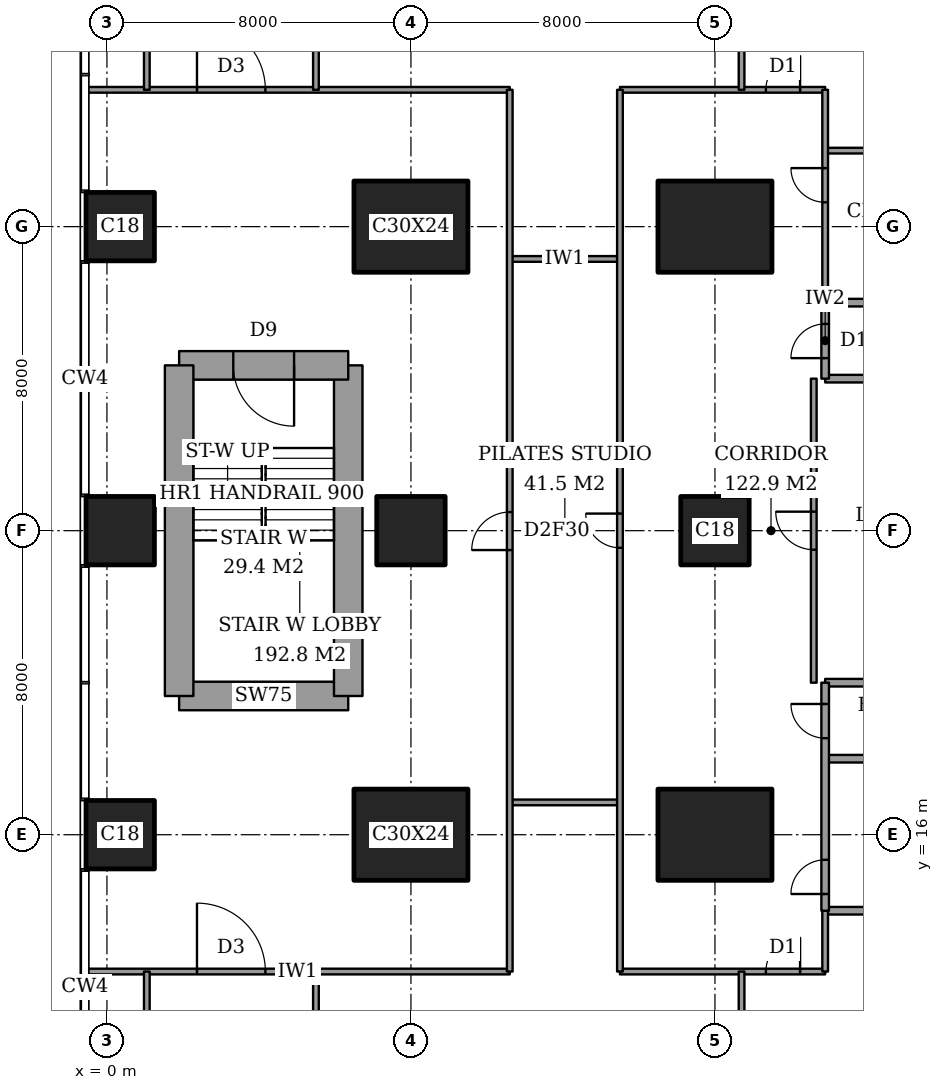
"""IFC4 building model, lengths in metres.
Left out: names, types, materials, properties, quantities, classifications, styles, units other than length and angle.
Written with IfcOpenShell. Run it as: python <this file> out.ifc"""

import sys

from ifc_helpers import new_model, si_unit, direction, frame, frame_2d, origin, origin_2d, place, context, subcontext, project, spatial, rectangle, extrude, element, fill, save


model = new_model("IFC4")
c1 = context("Model", 3, precision=1e-05, world=origin(), true_north=direction((0.0, 1.0)))
c2 = subcontext(c1, "Body", "Model", "MODEL_VIEW")
j1 = project(units=[si_unit("LENGTHUNIT", "METRE"), si_unit("PLANEANGLEUNIT", "RADIAN")], contexts=[c1])
p1 = place(None, origin())
s1 = spatial("IfcSite", under=j1, at=p1, CompositionType="ELEMENT")
p2 = place(p1, origin())
s2 = spatial("IfcBuilding", under=s1, at=p2, CompositionType="ELEMENT")
p3 = place(p2, frame((0.0, 0.0, 200.2)))
s3 = spatial("IfcBuildingStorey", under=s2, at=p3, CompositionType="ELEMENT", Elevation=200.2)
for number, where, z_axis, x_axis in (
    (1, (0.35, 16.0, 0.0), (0.0, 0.0, 1.0), (1.0, 0.0, 0.0)),
    (2, (0.35, 24.0, 0.0), (0.0, 0.0, 1.0), (1.0, 0.0, 0.0)),
    (3, (0.35, 32.0, 0.0), (0.0, 0.0, 1.0), (1.0, 0.0, 0.0)),
):
    element("IfcColumn", number, at=place(p3, frame(where, z_axis=z_axis, x_axis=x_axis)), inside=s3, PredefinedType="COLUMN", context=c2, shape_type="SweptSolid", body=[
        extrude(rectangle(XDim=1.8, YDim=1.8, at=origin_2d()), origin(), (0.0, 0.0, 1.0), 3.6),
    ])
p4 = place(p3, frame((8.0, 16.0, 0.0), z_axis=(0.0, 0.0, 1.0), x_axis=(1.0, 0.0, 0.0)))
e4 = element("IfcColumn", 4, at=p4, inside=s3, PredefinedType="COLUMN", context=c2, shape_type="SweptSolid", body=[
    extrude(rectangle(XDim=3.0, YDim=2.4, at=origin_2d()), origin(), (0.0, 0.0, 1.0), 3.6),
])
p5 = place(p3, frame((8.0, 24.0, 0.0), z_axis=(0.0, 0.0, 1.0), x_axis=(1.0, 0.0, 0.0)))
e5 = element("IfcColumn", 5, at=p5, inside=s3, PredefinedType="COLUMN", context=c2, shape_type="SweptSolid", body=[
    extrude(rectangle(XDim=1.8, YDim=1.8, at=origin_2d()), origin(), (0.0, 0.0, 1.0), 3.6),
])
for number, where, z_axis, x_axis in (
    (6, (8.0, 32.0, 0.0), (0.0, 0.0, 1.0), (1.0, 0.0, 0.0)),
    (7, (16.0, 16.0, 0.0), (0.0, 0.0, 1.0), (1.0, 0.0, 0.0)),
):
    element("IfcColumn", number, at=place(p3, frame(where, z_axis=z_axis, x_axis=x_axis)), inside=s3, PredefinedType="COLUMN", context=c2, shape_type="SweptSolid", body=[
        extrude(rectangle(XDim=3.0, YDim=2.4, at=origin_2d()), origin(), (0.0, 0.0, 1.0), 3.6),
    ])
p6 = place(p3, frame((16.0, 24.0, 0.0), z_axis=(0.0, 0.0, 1.0), x_axis=(1.0, 0.0, 0.0)))
e8 = element("IfcColumn", 8, at=p6, inside=s3, PredefinedType="COLUMN", context=c2, shape_type="SweptSolid", body=[
    extrude(rectangle(XDim=1.8, YDim=1.8, at=origin_2d()), origin(), (0.0, 0.0, 1.0), 3.6),
])
p7 = place(p3, frame((16.0, 32.0, 0.0), z_axis=(0.0, 0.0, 1.0), x_axis=(1.0, 0.0, 0.0)))
e9 = element("IfcColumn", 9, at=p7, inside=s3, PredefinedType="COLUMN", context=c2, shape_type="SweptSolid", body=[
    extrude(rectangle(XDim=3.0, YDim=2.4, at=origin_2d()), origin(), (0.0, 0.0, 1.0), 3.6),
])
p8 = place(p3, frame((1.9, 19.65, 0.0), z_axis=(0.0, 0.0, 1.0), x_axis=(1.0, 0.0, 0.0)))
e10 = element("IfcWall", 10, at=p8, inside=s3, PredefinedType="SHEAR", context=c2, shape_type="SweptSolid", body=[
    extrude(rectangle(XDim=4.45, YDim=0.75, at=frame_2d((2.225, 0.0))), origin(), (0.0, 0.0, 1.0), 3.6),
])
p9 = place(p3, frame((6.35, 19.65, 0.0), z_axis=(0.0, 0.0, 1.0), x_axis=(0.0, 1.0, 0.0)))
e11 = element("IfcWall", 11, at=p9, inside=s3, PredefinedType="SHEAR", context=c2, shape_type="SweptSolid", body=[
    extrude(rectangle(XDim=8.7, YDim=0.75, at=frame_2d((4.35, 0.0))), origin(), (0.0, 0.0, 1.0), 3.6),
])
p10 = place(p3, frame((6.35, 28.35, 0.0), z_axis=(0.0, 0.0, 1.0), x_axis=(-1.0, 0.0, 0.0)))
e12 = element("IfcWall", 12, at=p10, inside=s3, PredefinedType="SHEAR", context=c2, shape_type="SweptSolid", body=[
    extrude(rectangle(XDim=4.45, YDim=0.75, at=frame_2d((2.225, 0.0))), origin(), (0.0, 0.0, 1.0), 3.6),
])
p11 = place(p10, frame((1.425, 0.0, 0.0)))
e13 = element("IfcOpeningElement", 13, at=p11, cuts=e12, PredefinedType="OPENING", context=c2, shape_type="SweptSolid", body=[
    extrude(rectangle(XDim=1.6, YDim=2.1, at=frame_2d((0.8, 1.05))), frame((0.0, 0.385, 0.0), z_axis=(0.0, -1.0, 0.0), x_axis=(1.0, 0.0, 0.0)), (0.0, 0.0, 1.0), 0.77),
])
p12 = place(p3, frame((1.9, 28.35, 0.0), z_axis=(0.0, 0.0, 1.0), x_axis=(0.0, -1.0, 0.0)))
e14 = element("IfcWall", 14, at=p12, inside=s3, PredefinedType="SHEAR", context=c2, shape_type="SweptSolid", body=[
    extrude(rectangle(XDim=8.7, YDim=0.75, at=frame_2d((4.35, 0.0))), origin(), (0.0, 0.0, 1.0), 3.6),
])
p13 = place(p3, frame((-0.561, 12.4, 0.0), z_axis=(0.0, 0.0, 1.0), x_axis=(1.0, 0.0, 0.0)))
e15 = element("IfcWall", 15, at=p13, inside=s3, PredefinedType="PARTITIONING", context=c2, shape_type="SweptSolid", body=[
    extrude(rectangle(XDim=11.161, YDim=0.15, at=frame_2d((5.581, 0.0))), origin(), (0.0, 0.0, 1.0), 3.35),
])
p14 = place(p13, frame((2.931, 0.0, 0.0)))
e16 = element("IfcOpeningElement", 16, at=p14, cuts=e15, PredefinedType="OPENING", context=c2, shape_type="SweptSolid", body=[
    extrude(rectangle(XDim=1.8, YDim=2.1, at=frame_2d((0.9, 1.05))), frame((0.0, 0.085, 0.0), z_axis=(0.0, -1.0, 0.0), x_axis=(1.0, 0.0, 0.0)), (0.0, 0.0, 1.0), 0.17),
])
p15 = place(p3, frame((13.5, 12.4, 0.0), z_axis=(0.0, 0.0, 1.0), x_axis=(1.0, 0.0, 0.0)))
e17 = element("IfcWall", 17, at=p15, inside=s3, PredefinedType="PARTITIONING", context=c2, shape_type="SweptSolid", body=[
    extrude(rectangle(XDim=5.4, YDim=0.15, at=frame_2d((2.7, 0.0))), origin(), (0.0, 0.0, 1.0), 3.35),
])
p16 = place(p15, frame((3.84, 0.0, 0.0)))
e18 = element("IfcOpeningElement", 18, at=p16, cuts=e17, PredefinedType="OPENING", context=c2, shape_type="SweptSolid", body=[
    extrude(rectangle(XDim=0.9, YDim=2.1, at=frame_2d((0.45, 1.05))), frame((0.0, 0.085, 0.0), z_axis=(0.0, -1.0, 0.0), x_axis=(1.0, 0.0, 0.0)), (0.0, 0.0, 1.0), 0.17),
])
p17 = place(p3, frame((18.9, 14.0, 0.0), z_axis=(0.0, 0.0, 1.0), x_axis=(1.0, 0.0, 0.0)))
e19 = element("IfcWall", 19, at=p17, inside=s3, PredefinedType="PARTITIONING", context=c2, shape_type="SweptSolid", body=[
    extrude(rectangle(XDim=5.1, YDim=0.2, at=frame_2d((2.55, 0.0))), origin(), (0.0, 0.0, 1.0), 3.35),
])
p18 = place(p3, frame((10.6, 16.85, 0.0), z_axis=(0.0, 0.0, 1.0), x_axis=(1.0, 0.0, 0.0)))
e20 = element("IfcWall", 20, at=p18, inside=s3, PredefinedType="PARTITIONING", context=c2, shape_type="SweptSolid", body=[
    extrude(rectangle(XDim=2.9, YDim=0.15, at=frame_2d((1.45, 0.0))), origin(), (0.0, 0.0, 1.0), 3.35),
])
for number, where, z_axis, x_axis in (
    (21, (18.9, 18.0, 0.0), (0.0, 0.0, 1.0), (1.0, 0.0, 0.0)),
    (22, (18.9, 20.0, 0.0), (0.0, 0.0, 1.0), (1.0, 0.0, 0.0)),
    (23, (18.9, 28.0, 0.0), (0.0, 0.0, 1.0), (1.0, 0.0, 0.0)),
    (24, (18.9, 30.0, 0.0), (0.0, 0.0, 1.0), (1.0, 0.0, 0.0)),
):
    element("IfcWall", number, at=place(p3, frame(where, z_axis=z_axis, x_axis=x_axis)), inside=s3, PredefinedType="PARTITIONING", context=c2, shape_type="SweptSolid", body=[
        extrude(rectangle(XDim=5.1, YDim=0.2, at=frame_2d((2.55, 0.0))), origin(), (0.0, 0.0, 1.0), 3.35),
    ])
p19 = place(p3, frame((10.6, 31.15, 0.0), z_axis=(0.0, 0.0, 1.0), x_axis=(1.0, 0.0, 0.0)))
e25 = element("IfcWall", 25, at=p19, inside=s3, PredefinedType="PARTITIONING", context=c2, shape_type="SweptSolid", body=[
    extrude(rectangle(XDim=2.9, YDim=0.15, at=frame_2d((1.45, 0.0))), origin(), (0.0, 0.0, 1.0), 3.35),
])
p20 = place(p3, frame((18.9, 34.0, 0.0), z_axis=(0.0, 0.0, 1.0), x_axis=(1.0, 0.0, 0.0)))
e26 = element("IfcWall", 26, at=p20, inside=s3, PredefinedType="PARTITIONING", context=c2, shape_type="SweptSolid", body=[
    extrude(rectangle(XDim=5.1, YDim=0.15, at=frame_2d((2.55, 0.0))), origin(), (0.0, 0.0, 1.0), 3.35),
])
p21 = place(p3, frame((-0.561, 35.6, 0.0), z_axis=(0.0, 0.0, 1.0), x_axis=(1.0, 0.0, 0.0)))
e27 = element("IfcWall", 27, at=p21, inside=s3, PredefinedType="PARTITIONING", context=c2, shape_type="SweptSolid", body=[
    extrude(rectangle(XDim=11.161, YDim=0.15, at=frame_2d((5.581, 0.0))), origin(), (0.0, 0.0, 1.0), 3.35),
])
p22 = place(p21, frame((2.931, 0.0, 0.0)))
e28 = element("IfcOpeningElement", 28, at=p22, cuts=e27, PredefinedType="OPENING", context=c2, shape_type="SweptSolid", body=[
    extrude(rectangle(XDim=1.8, YDim=2.1, at=frame_2d((0.9, 1.05))), frame((0.0, 0.085, 0.0), z_axis=(0.0, -1.0, 0.0), x_axis=(1.0, 0.0, 0.0)), (0.0, 0.0, 1.0), 0.17),
])
p23 = place(p3, frame((13.5, 35.6, 0.0), z_axis=(0.0, 0.0, 1.0), x_axis=(1.0, 0.0, 0.0)))
e29 = element("IfcWall", 29, at=p23, inside=s3, PredefinedType="PARTITIONING", context=c2, shape_type="SweptSolid", body=[
    extrude(rectangle(XDim=5.4, YDim=0.15, at=frame_2d((2.7, 0.0))), origin(), (0.0, 0.0, 1.0), 3.35),
])
p24 = place(p23, frame((3.84, 0.0, 0.0)))
e30 = element("IfcOpeningElement", 30, at=p24, cuts=e29, PredefinedType="OPENING", context=c2, shape_type="SweptSolid", body=[
    extrude(rectangle(XDim=0.9, YDim=2.1, at=frame_2d((0.45, 1.05))), frame((0.0, 0.085, 0.0), z_axis=(0.0, -1.0, 0.0), x_axis=(1.0, 0.0, 0.0)), (0.0, 0.0, 1.0), 0.17),
])
for number, where, z_axis, x_axis in (
    (31, (1.05, 8.9, 0.0), (0.0, 0.0, 1.0), (0.0, 1.0, 0.0)),
    (32, (1.05, 35.6, 0.0), (0.0, 0.0, 1.0), (0.0, 1.0, 0.0)),
):
    element("IfcWall", number, at=place(p3, frame(where, z_axis=z_axis, x_axis=x_axis)), inside=s3, PredefinedType="PARTITIONING", context=c2, shape_type="SweptSolid", body=[
        extrude(rectangle(XDim=3.5, YDim=0.15, at=frame_2d((1.75, 0.0))), origin(), (0.0, 0.0, 1.0), 3.35),
    ])
p25 = place(p3, frame((5.5, -0.45, 0.0), z_axis=(0.0, 0.0, 1.0), x_axis=(0.0, 1.0, 0.0)))
e33 = element("IfcWall", 33, at=p25, inside=s3, PredefinedType="PARTITIONING", context=c2, shape_type="SweptSolid", body=[
    extrude(rectangle(XDim=12.85, YDim=0.15, at=frame_2d((6.425, 0.0))), origin(), (0.0, 0.0, 1.0), 3.35),
])
p26 = place(p25, frame((5.98, 0.0, 0.0)))
e34 = element("IfcOpeningElement", 34, at=p26, cuts=e33, PredefinedType="OPENING", context=c2, shape_type="SweptSolid", body=[
    extrude(rectangle(XDim=0.9, YDim=2.1, at=frame_2d((0.45, 1.05))), frame((0.0, 0.085, 0.0), z_axis=(0.0, -1.0, 0.0), x_axis=(1.0, 0.0, 0.0)), (0.0, 0.0, 1.0), 0.17),
])
p27 = place(p3, frame((5.5, 35.6, 0.0), z_axis=(0.0, 0.0, 1.0), x_axis=(0.0, 1.0, 0.0)))
e35 = element("IfcWall", 35, at=p27, inside=s3, PredefinedType="PARTITIONING", context=c2, shape_type="SweptSolid", body=[
    extrude(rectangle(XDim=12.85, YDim=0.15, at=frame_2d((6.425, 0.0))), origin(), (0.0, 0.0, 1.0), 3.35),
])
p28 = place(p27, frame((5.98, 0.0, 0.0)))
e36 = element("IfcOpeningElement", 36, at=p28, cuts=e35, PredefinedType="OPENING", context=c2, shape_type="SweptSolid", body=[
    extrude(rectangle(XDim=0.9, YDim=2.1, at=frame_2d((0.45, 1.05))), frame((0.0, 0.085, 0.0), z_axis=(0.0, -1.0, 0.0), x_axis=(1.0, 0.0, 0.0)), (0.0, 0.0, 1.0), 0.17),
])
p29 = place(p3, frame((10.6, 12.4, 0.0), z_axis=(0.0, 0.0, 1.0), x_axis=(0.0, 1.0, 0.0)))
e37 = element("IfcWall", 37, at=p29, inside=s3, PredefinedType="PARTITIONING", context=c2, shape_type="SweptSolid", body=[
    extrude(rectangle(XDim=23.2, YDim=0.15, at=frame_2d((11.6, 0.0))), origin(), (0.0, 0.0, 1.0), 3.35),
])
p30 = place(p29, frame((11.09, 0.0, 0.0)))
e38 = element("IfcOpeningElement", 38, at=p30, cuts=e37, PredefinedType="OPENING", context=c2, shape_type="SweptSolid", body=[
    extrude(rectangle(XDim=1.0, YDim=2.1, at=frame_2d((0.5, 1.05))), frame((0.0, 0.085, 0.0), z_axis=(0.0, -1.0, 0.0), x_axis=(1.0, 0.0, 0.0)), (0.0, 0.0, 1.0), 0.17),
])
p31 = place(p3, frame((13.5, 12.4, 0.0), z_axis=(0.0, 0.0, 1.0), x_axis=(0.0, 1.0, 0.0)))
e39 = element("IfcWall", 39, at=p31, inside=s3, PredefinedType="PARTITIONING", context=c2, shape_type="SweptSolid", body=[
    extrude(rectangle(XDim=23.2, YDim=0.15, at=frame_2d((11.6, 0.0))), origin(), (0.0, 0.0, 1.0), 3.35),
])
p32 = place(p31, frame((11.15, 0.0, 0.0)))
e40 = element("IfcOpeningElement", 40, at=p32, cuts=e39, PredefinedType="OPENING", context=c2, shape_type="SweptSolid", body=[
    extrude(rectangle(XDim=0.9, YDim=2.1, at=frame_2d((0.45, 1.05))), frame((0.0, 0.085, 0.0), z_axis=(0.0, -1.0, 0.0), x_axis=(1.0, 0.0, 0.0)), (0.0, 0.0, 1.0), 0.17),
])
for number, where, z_axis, x_axis in (
    (41, (16.7, 8.9, 0.0), (0.0, 0.0, 1.0), (0.0, 1.0, 0.0)),
    (42, (16.7, 35.6, 0.0), (0.0, 0.0, 1.0), (0.0, 1.0, 0.0)),
):
    element("IfcWall", number, at=place(p3, frame(where, z_axis=z_axis, x_axis=x_axis)), inside=s3, PredefinedType="PARTITIONING", context=c2, shape_type="SweptSolid", body=[
        extrude(rectangle(XDim=3.5, YDim=0.15, at=frame_2d((1.75, 0.0))), origin(), (0.0, 0.0, 1.0), 3.35),
    ])
p33 = place(p3, frame((18.6, 20.0, 0.0), z_axis=(0.0, 0.0, 1.0), x_axis=(0.0, 1.0, 0.0)))
e43 = element("IfcWall", 43, at=p33, inside=s3, PredefinedType="PARTITIONING", context=c2, shape_type="SweptSolid", body=[
    extrude(rectangle(XDim=8.0, YDim=0.15, at=frame_2d((4.0, 0.0))), origin(), (0.0, 0.0, 1.0), 3.35),
])
p34 = place(p33, frame((3.5, 0.0, 0.0)))
e44 = element("IfcOpeningElement", 44, at=p34, cuts=e43, PredefinedType="OPENING", context=c2, shape_type="SweptSolid", body=[
    extrude(rectangle(XDim=1.0, YDim=2.1, at=frame_2d((0.5, 1.05))), frame((0.0, 0.085, 0.0), z_axis=(0.0, -1.0, 0.0), x_axis=(1.0, 0.0, 0.0)), (0.0, 0.0, 1.0), 0.17),
])
p35 = place(p3, frame((18.9, 14.0, 0.0), z_axis=(0.0, 0.0, 1.0), x_axis=(0.0, 1.0, 0.0)))
e45 = element("IfcWall", 45, at=p35, inside=s3, PredefinedType="PARTITIONING", context=c2, shape_type="SweptSolid", body=[
    extrude(rectangle(XDim=6.0, YDim=0.2, at=frame_2d((3.0, 0.0))), origin(), (0.0, 0.0, 1.0), 3.35),
])
p36 = place(p35, frame((0.44, 0.0, 0.0)))
e46 = element("IfcOpeningElement", 46, at=p36, cuts=e45, PredefinedType="OPENING", context=c2, shape_type="SweptSolid", body=[
    extrude(rectangle(XDim=0.9, YDim=2.1, at=frame_2d((0.45, 1.05))), frame((0.0, 0.11, 0.0), z_axis=(0.0, -1.0, 0.0), x_axis=(1.0, 0.0, 0.0)), (0.0, 0.0, 1.0), 0.22),
])
p37 = place(p35, frame((4.54, 0.0, 0.0)))
e47 = element("IfcOpeningElement", 47, at=p37, cuts=e45, PredefinedType="OPENING", context=c2, shape_type="SweptSolid", body=[
    extrude(rectangle(XDim=0.9, YDim=2.1, at=frame_2d((0.45, 1.05))), frame((0.0, 0.11, 0.0), z_axis=(0.0, -1.0, 0.0), x_axis=(1.0, 0.0, 0.0)), (0.0, 0.0, 1.0), 0.22),
])
p38 = place(p3, frame((18.9, 28.0, 0.0), z_axis=(0.0, 0.0, 1.0), x_axis=(0.0, 1.0, 0.0)))
e48 = element("IfcWall", 48, at=p38, inside=s3, PredefinedType="PARTITIONING", context=c2, shape_type="SweptSolid", body=[
    extrude(rectangle(XDim=2.0, YDim=0.2, at=frame_2d((1.0, 0.0))), origin(), (0.0, 0.0, 1.0), 3.35),
])
p39 = place(p38, frame((0.54, 0.0, 0.0)))
e49 = element("IfcOpeningElement", 49, at=p39, cuts=e48, PredefinedType="OPENING", context=c2, shape_type="SweptSolid", body=[
    extrude(rectangle(XDim=0.9, YDim=2.1, at=frame_2d((0.45, 1.05))), frame((0.0, 0.11, 0.0), z_axis=(0.0, -1.0, 0.0), x_axis=(1.0, 0.0, 0.0)), (0.0, 0.0, 1.0), 0.22),
])
p40 = place(p3, frame((18.9, 12.4, 0.0), z_axis=(0.0, 0.0, 1.0), x_axis=(0.0, 1.0, 0.0)))
e50 = element("IfcWall", 50, at=p40, inside=s3, PredefinedType="PARTITIONING", context=c2, shape_type="SweptSolid", body=[
    extrude(rectangle(XDim=1.6, YDim=0.15, at=frame_2d((0.8, 0.0))), origin(), (0.0, 0.0, 1.0), 3.35),
])
p41 = place(p3, frame((18.9, 30.0, 0.0), z_axis=(0.0, 0.0, 1.0), x_axis=(0.0, 1.0, 0.0)))
e51 = element("IfcWall", 51, at=p41, inside=s3, PredefinedType="PARTITIONING", context=c2, shape_type="SweptSolid", body=[
    extrude(rectangle(XDim=5.6, YDim=0.15, at=frame_2d((2.8, 0.0))), origin(), (0.0, 0.0, 1.0), 3.35),
])
p42 = place(p41, frame((2.64, 0.0, 0.0)))
e52 = element("IfcOpeningElement", 52, at=p42, cuts=e51, PredefinedType="OPENING", context=c2, shape_type="SweptSolid", body=[
    extrude(rectangle(XDim=0.9, YDim=2.1, at=frame_2d((0.45, 1.05))), frame((0.0, 0.085, 0.0), z_axis=(0.0, -1.0, 0.0), x_axis=(1.0, 0.0, 0.0)), (0.0, 0.0, 1.0), 0.17),
])
p43 = place(p30, origin())
e53 = element("IfcDoor", 53, at=p43, inside=s3, OperationType="SINGLE_SWING_RIGHT", PredefinedType="DOOR", context=c2, shape_type="SweptSolid", body=[
    extrude(rectangle(XDim=1.0, YDim=2.1, at=frame_2d((0.5, 1.05))), frame((0.0, 0.025, 0.0), z_axis=(0.0, -1.0, 0.0), x_axis=(1.0, 0.0, 0.0)), (0.0, 0.0, 1.0), 0.05),
])
fill(e38, e53)
p44 = place(p32, origin())
e54 = element("IfcDoor", 54, at=p44, inside=s3, OperationType="SINGLE_SWING_LEFT", PredefinedType="DOOR", context=c2, shape_type="SweptSolid", body=[
    extrude(rectangle(XDim=0.9, YDim=2.1, at=frame_2d((0.45, 1.05))), frame((0.0, 0.025, 0.0), z_axis=(0.0, -1.0, 0.0), x_axis=(1.0, 0.0, 0.0)), (0.0, 0.0, 1.0), 0.05),
])
fill(e40, e54)
p45 = place(p34, origin())
e55 = element("IfcDoor", 55, at=p45, inside=s3, OperationType="SINGLE_SWING_LEFT", PredefinedType="DOOR", context=c2, shape_type="SweptSolid", body=[
    extrude(rectangle(XDim=1.0, YDim=2.1, at=frame_2d((0.5, 1.05))), frame((0.0, 0.025, 0.0), z_axis=(0.0, -1.0, 0.0), x_axis=(1.0, 0.0, 0.0)), (0.0, 0.0, 1.0), 0.05),
])
fill(e44, e55)
p46 = place(p36, origin())
e56 = element("IfcDoor", 56, at=p46, inside=s3, OperationType="SINGLE_SWING_RIGHT", PredefinedType="DOOR", context=c2, shape_type="SweptSolid", body=[
    extrude(rectangle(XDim=0.9, YDim=2.1, at=frame_2d((0.45, 1.05))), frame((0.0, 0.025, 0.0), z_axis=(0.0, -1.0, 0.0), x_axis=(1.0, 0.0, 0.0)), (0.0, 0.0, 1.0), 0.05),
])
fill(e46, e56)
p47 = place(p37, origin())
e57 = element("IfcDoor", 57, at=p47, inside=s3, OperationType="SINGLE_SWING_LEFT", PredefinedType="DOOR", context=c2, shape_type="SweptSolid", body=[
    extrude(rectangle(XDim=0.9, YDim=2.1, at=frame_2d((0.45, 1.05))), frame((0.0, 0.025, 0.0), z_axis=(0.0, -1.0, 0.0), x_axis=(1.0, 0.0, 0.0)), (0.0, 0.0, 1.0), 0.05),
])
fill(e47, e57)
p48 = place(p39, origin())
e58 = element("IfcDoor", 58, at=p48, inside=s3, OperationType="SINGLE_SWING_RIGHT", PredefinedType="DOOR", context=c2, shape_type="SweptSolid", body=[
    extrude(rectangle(XDim=0.9, YDim=2.1, at=frame_2d((0.45, 1.05))), frame((0.0, 0.025, 0.0), z_axis=(0.0, -1.0, 0.0), x_axis=(1.0, 0.0, 0.0)), (0.0, 0.0, 1.0), 0.05),
])
fill(e49, e58)
p49 = place(p42, origin())
e59 = element("IfcDoor", 59, at=p49, inside=s3, OperationType="SINGLE_SWING_LEFT", PredefinedType="DOOR", context=c2, shape_type="SweptSolid", body=[
    extrude(rectangle(XDim=0.9, YDim=2.1, at=frame_2d((0.45, 1.05))), frame((0.0, 0.025, 0.0), z_axis=(0.0, -1.0, 0.0), x_axis=(1.0, 0.0, 0.0)), (0.0, 0.0, 1.0), 0.05),
])
fill(e52, e59)
p50 = place(p14, origin())
e60 = element("IfcDoor", 60, at=p50, inside=s3, OperationType="DOUBLE_DOOR_DOUBLE_SWING", PredefinedType="DOOR", context=c2, shape_type="SweptSolid", body=[
    extrude(rectangle(XDim=1.8, YDim=2.1, at=frame_2d((0.9, 1.05))), frame((0.0, 0.025, 0.0), z_axis=(0.0, -1.0, 0.0), x_axis=(1.0, 0.0, 0.0)), (0.0, 0.0, 1.0), 0.05),
])
fill(e16, e60)
p51 = place(p16, origin())
e61 = element("IfcDoor", 61, at=p51, inside=s3, OperationType="SINGLE_SWING_LEFT", PredefinedType="DOOR", context=c2, shape_type="SweptSolid", body=[
    extrude(rectangle(XDim=0.9, YDim=2.1, at=frame_2d((0.45, 1.05))), frame((0.0, 0.025, 0.0), z_axis=(0.0, -1.0, 0.0), x_axis=(1.0, 0.0, 0.0)), (0.0, 0.0, 1.0), 0.05),
])
fill(e18, e61)
p52 = place(p22, origin())
e62 = element("IfcDoor", 62, at=p52, inside=s3, OperationType="DOUBLE_DOOR_DOUBLE_SWING", PredefinedType="DOOR", context=c2, shape_type="SweptSolid", body=[
    extrude(rectangle(XDim=1.8, YDim=2.1, at=frame_2d((0.9, 1.05))), frame((0.0, 0.025, 0.0), z_axis=(0.0, -1.0, 0.0), x_axis=(1.0, 0.0, 0.0)), (0.0, 0.0, 1.0), 0.05),
])
fill(e28, e62)
p53 = place(p24, origin())
e63 = element("IfcDoor", 63, at=p53, inside=s3, OperationType="SINGLE_SWING_LEFT", PredefinedType="DOOR", context=c2, shape_type="SweptSolid", body=[
    extrude(rectangle(XDim=0.9, YDim=2.1, at=frame_2d((0.45, 1.05))), frame((0.0, 0.025, 0.0), z_axis=(0.0, -1.0, 0.0), x_axis=(1.0, 0.0, 0.0)), (0.0, 0.0, 1.0), 0.05),
])
fill(e30, e63)
p54 = place(p11, origin())
e64 = element("IfcDoor", 64, at=p54, inside=s3, OperationType="DOUBLE_DOOR_SINGLE_SWING", PredefinedType="DOOR", context=c2, shape_type="SweptSolid", body=[
    extrude(rectangle(XDim=1.6, YDim=2.1, at=frame_2d((0.8, 1.05))), frame((0.0, 0.025, 0.0), z_axis=(0.0, -1.0, 0.0), x_axis=(1.0, 0.0, 0.0)), (0.0, 0.0, 1.0), 0.05),
])
fill(e13, e64)
save(model, sys.argv[1])
